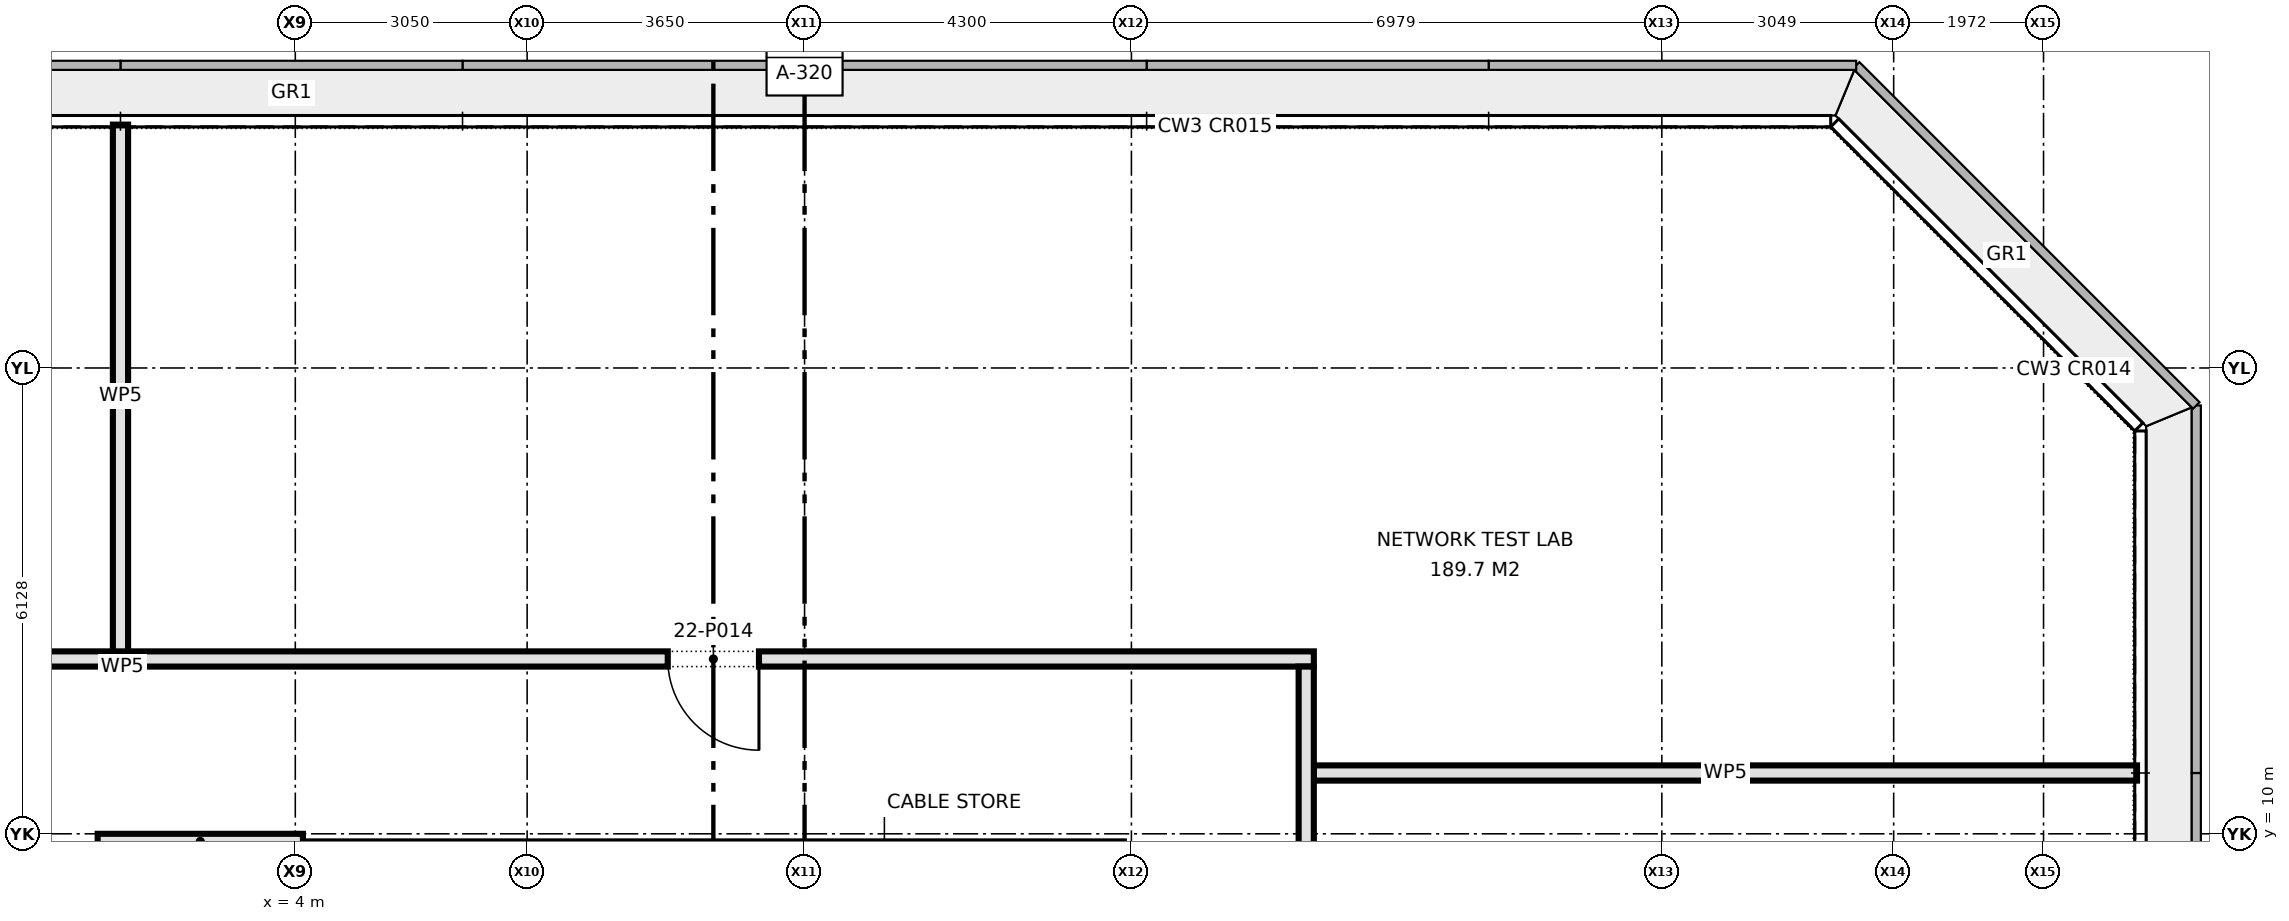
"""IFC4 building model, lengths in metres.
Left out: names, types, materials, properties, quantities, classifications, styles, units other than length and angle.
Written with IfcOpenShell. Run it as: python <this file> out.ifc"""

import sys

from ifc_helpers import new_model, si_unit, direction, frame, frame_2d, origin, place, context, subcontext, project, spatial, rectangle, extrude, element, fill, save


model = new_model("IFC4")
c1 = context("Model", 3, precision=1e-05, world=origin(), true_north=direction((0.0, 1.0)))
c2 = subcontext(c1, "Body", "Model", "MODEL_VIEW")
j1 = project(units=[si_unit("LENGTHUNIT", "METRE"), si_unit("PLANEANGLEUNIT", "RADIAN")], contexts=[c1])
p1 = place(None, origin())
s1 = spatial("IfcSite", under=j1, at=p1, CompositionType="ELEMENT")
p2 = place(p1, origin())
s2 = spatial("IfcBuilding", under=s1, at=p2, CompositionType="ELEMENT")
p3 = place(p2, frame((0.0, 0.0, 99.6)))
s3 = spatial("IfcBuildingStorey", under=s2, at=p3, CompositionType="ELEMENT", Elevation=99.6)
p4 = place(p3, frame((1.4, 9.9, 0.0), z_axis=(0.0, 0.0, 1.0), x_axis=(1.0, 0.0, 0.0)))
e1 = element("IfcWall", 1, at=p4, inside=s3, PredefinedType="PARTITIONING", context=c2, shape_type="SweptSolid", body=[
    extrude(rectangle(XDim=2.7, YDim=0.2, at=frame_2d((1.35, 0.0))), origin(), (0.0, 0.0, 1.0), 3.263),
])
p5 = place(p3, frame((17.4, 10.8, 0.0), z_axis=(0.0, 0.0, 1.0), x_axis=(1.0, 0.0, 0.0)))
e2 = element("IfcWall", 2, at=p5, inside=s3, PredefinedType="PARTITIONING", context=c2, shape_type="SweptSolid", body=[
    extrude(rectangle(XDim=10.83, YDim=0.2, at=frame_2d((5.415, 0.0))), origin(), (0.0, 0.0, 1.0), 4.2),
])
p6 = place(p3, frame((-17.2, 12.3, 0.0), z_axis=(0.0, 0.0, 1.0), x_axis=(1.0, 0.0, 0.0)))
e3 = element("IfcWall", 3, at=p6, inside=s3, PredefinedType="PARTITIONING", context=c2, shape_type="SweptSolid", body=[
    extrude(rectangle(XDim=34.6, YDim=0.2, at=frame_2d((17.3, 0.0))), origin(), (0.0, 0.0, 1.0), 4.2),
])
p7 = place(p6, frame((9.95, 0.0, 0.0)))
e4 = element("IfcOpeningElement", 4, at=p7, cuts=e3, PredefinedType="OPENING", context=c2, shape_type="SweptSolid", body=[
    extrude(rectangle(XDim=1.8, YDim=2.1, at=frame_2d((0.9, 1.05))), frame((0.0, 0.11, 0.0), z_axis=(0.0, -1.0, 0.0), x_axis=(1.0, 0.0, 0.0)), (0.0, 0.0, 1.0), 0.22),
])
p8 = place(p6, frame((0.75, 0.0, 0.0)))
e5 = element("IfcOpeningElement", 5, at=p8, cuts=e3, PredefinedType="OPENING", context=c2, shape_type="SweptSolid", body=[
    extrude(rectangle(XDim=1.2, YDim=2.1, at=frame_2d((0.6, 1.05))), frame((0.0, 0.11, 0.0), z_axis=(0.0, -1.0, 0.0), x_axis=(1.0, 0.0, 0.0)), (0.0, 0.0, 1.0), 0.22),
])
p9 = place(p6, frame((26.1, 0.0, 0.0)))
e6 = element("IfcOpeningElement", 6, at=p9, cuts=e3, PredefinedType="OPENING", context=c2, shape_type="SweptSolid", body=[
    extrude(rectangle(XDim=1.2, YDim=2.1, at=frame_2d((0.6, 1.05))), frame((0.0, 0.11, 0.0), z_axis=(0.0, -1.0, 0.0), x_axis=(1.0, 0.0, 0.0)), (0.0, 0.0, 1.0), 0.22),
])
p10 = place(p3, frame((17.3, -12.2, 0.0), z_axis=(0.0, 0.0, 1.0), x_axis=(0.0, 1.0, 0.0)))
e7 = element("IfcWall", 7, at=p10, inside=s3, PredefinedType="PARTITIONING", context=c2, shape_type="SweptSolid", body=[
    extrude(rectangle(XDim=24.4, YDim=0.2, at=frame_2d((12.2, 0.0))), origin(), (0.0, 0.0, 1.0), 4.2),
])
p11 = place(p10, frame((11.85, 0.0, 0.0)))
e8 = element("IfcOpeningElement", 8, at=p11, cuts=e7, PredefinedType="OPENING", context=c2, shape_type="SweptSolid", body=[
    extrude(rectangle(XDim=1.8, YDim=2.1, at=frame_2d((0.9, 1.05))), frame((0.0, 0.11, 0.0), z_axis=(0.0, -1.0, 0.0), x_axis=(1.0, 0.0, 0.0)), (0.0, 0.0, 1.0), 0.22),
])
p12 = place(p10, frame((0.7, 0.0, 0.0)))
e9 = element("IfcOpeningElement", 9, at=p12, cuts=e7, PredefinedType="OPENING", context=c2, shape_type="SweptSolid", body=[
    extrude(rectangle(XDim=1.0, YDim=2.1, at=frame_2d((0.5, 1.05))), frame((0.0, 0.11, 0.0), z_axis=(0.0, -1.0, 0.0), x_axis=(1.0, 0.0, 0.0)), (0.0, 0.0, 1.0), 0.22),
])
p13 = place(p3, frame((1.7, 12.4, 0.0), z_axis=(0.0, 0.0, 1.0), x_axis=(0.0, 1.0, 0.0)))
e10 = element("IfcWall", 10, at=p13, inside=s3, PredefinedType="PARTITIONING", context=c2, shape_type="SweptSolid", body=[
    extrude(rectangle(XDim=6.93, YDim=0.2, at=frame_2d((3.465, 0.0))), origin(), (0.0, 0.0, 1.0), 4.2),
])
p14 = place(p9, frame((1.2, 0.0, 0.0), z_axis=(0.0, 0.0, 1.0), x_axis=(-1.0, 0.0, 0.0)))
e11 = element("IfcDoor", 11, at=p14, inside=s3, OperationType="SINGLE_SWING_LEFT", PredefinedType="DOOR", context=c2, shape_type="SweptSolid", body=[
    extrude(rectangle(XDim=1.2, YDim=2.1, at=frame_2d((0.6, 1.05))), frame((0.0, 0.025, 0.0), z_axis=(0.0, -1.0, 0.0), x_axis=(1.0, 0.0, 0.0)), (0.0, 0.0, 1.0), 0.05),
])
fill(e6, e11)
save(model, sys.argv[1])
